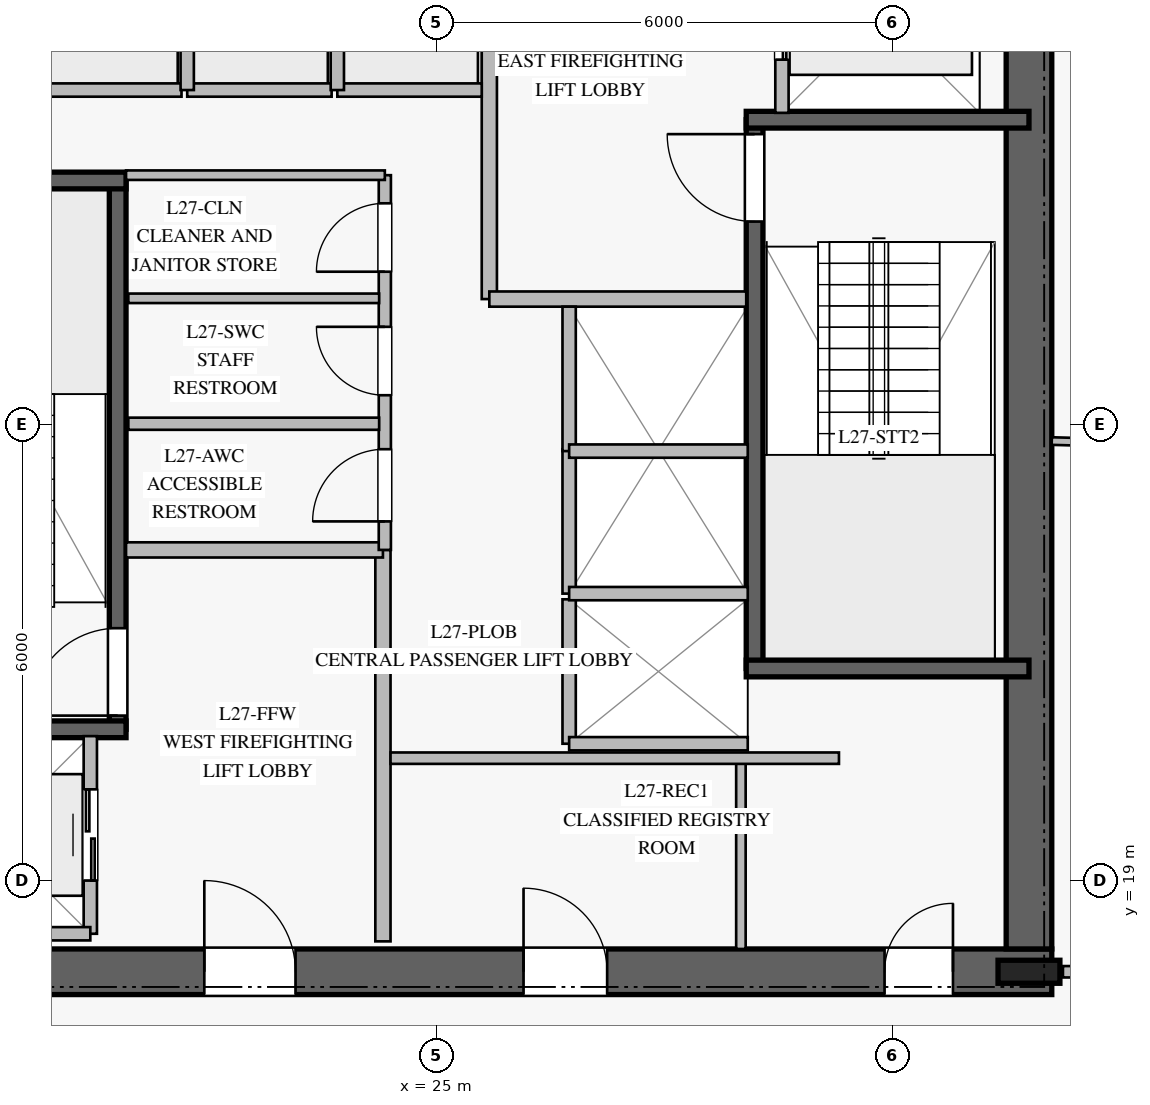
"""IFC4 building model, lengths in metres.
Left out: names, types, materials, properties, quantities, classifications, styles, units other than length and angle.
Written with IfcOpenShell. Run it as: python <this file> out.ifc"""

import sys

from ifc_helpers import new_model, si_unit, direction, frame, frame_2d, origin, origin_2d, place, context, subcontext, project, spatial, rectangle, i_section, extrude, element, fill, save


model = new_model("IFC4")
c1 = context("Model", 3, precision=1e-05, world=origin(), true_north=direction((0.0, 1.0)))
c2 = subcontext(c1, "Body", "Model", "MODEL_VIEW")
j1 = project(units=[si_unit("LENGTHUNIT", "METRE"), si_unit("PLANEANGLEUNIT", "RADIAN")], contexts=[c1])
p1 = place(None, origin())
s1 = spatial("IfcSite", under=j1, at=p1, CompositionType="ELEMENT")
p2 = place(p1, origin())
s2 = spatial("IfcBuilding", under=s1, at=p2, CompositionType="ELEMENT")
p3 = place(p2, frame((0.0, 0.0, 114.4)))
s3 = spatial("IfcBuildingStorey", under=s2, at=p3, CompositionType="ELEMENT", Elevation=114.4)
p4 = place(p3, frame((16.9, 17.8, 0.0), z_axis=(0.0, 0.0, 1.0), x_axis=(1.0, 0.0, 0.0)))
e1 = element("IfcWall", 1, at=p4, inside=s3, PredefinedType="SHEAR", context=c2, shape_type="SweptSolid", body=[
    extrude(rectangle(XDim=16.2, YDim=0.6, at=frame_2d((8.1, 0.0))), origin(), (0.0, 0.0, 1.0), 3.76),
])
p5 = place(p4, frame((5.05, 0.0, 0.0)))
e2 = element("IfcOpeningElement", 2, at=p5, cuts=e1, PredefinedType="OPENING", context=c2, shape_type="SweptSolid", body=[
    extrude(rectangle(XDim=1.2, YDim=2.25, at=frame_2d((0.6, 1.125))), frame((0.0, 0.31, 0.0), z_axis=(0.0, -1.0, 0.0), x_axis=(1.0, 0.0, 0.0)), (0.0, 0.0, 1.0), 0.62),
])
p6 = place(p4, frame((14.0, 0.0, 0.0)))
e3 = element("IfcOpeningElement", 3, at=p6, cuts=e1, PredefinedType="OPENING", context=c2, shape_type="SweptSolid", body=[
    extrude(rectangle(XDim=0.9, YDim=2.1, at=frame_2d((0.45, 1.05))), frame((0.0, 0.31, 0.0), z_axis=(0.0, -1.0, 0.0), x_axis=(1.0, 0.0, 0.0)), (0.0, 0.0, 1.0), 0.62),
])
p7 = place(p4, frame((9.25, 0.0, 0.0)))
e4 = element("IfcOpeningElement", 4, at=p7, cuts=e1, PredefinedType="OPENING", context=c2, shape_type="SweptSolid", body=[
    extrude(rectangle(XDim=1.1, YDim=2.2, at=frame_2d((0.55, 1.1))), frame((0.0, 0.31, 0.0), z_axis=(0.0, -1.0, 0.0), x_axis=(1.0, 0.0, 0.0)), (0.0, 0.0, 1.0), 0.62),
])
p8 = place(p3, frame((32.8, 18.1, 0.0), z_axis=(0.0, 0.0, 1.0), x_axis=(0.0, 1.0, 0.0)))
e5 = element("IfcWall", 5, at=p8, inside=s3, PredefinedType="SHEAR", context=c2, shape_type="SweptSolid", body=[
    extrude(rectangle(XDim=13.8, YDim=0.6, at=frame_2d((6.9, 0.0))), origin(), (0.0, 0.0, 1.0), 3.76),
])
p9 = place(p3, frame((32.8, 17.8, 0.0), z_axis=(0.0, 0.0, 1.0), x_axis=(1.0, 0.0, 0.0)))
e6 = element("IfcColumn", 6, at=p9, inside=s3, PredefinedType="COLUMN", context=c2, shape_type="SweptSolid", body=[
    extrude(i_section(OverallWidth=0.303, OverallDepth=0.814, WebThickness=0.021, FlangeThickness=0.04, at=origin_2d()), origin(), (0.0, 0.0, 1.0), 4.0),
])
p10 = place(p3, frame((20.81, 20.99, 0.0), z_axis=(0.0, 0.0, 1.0), x_axis=(0.0, 1.0, 0.0)))
e7 = element("IfcWall", 7, at=p10, inside=s3, PredefinedType="SOLIDWALL", context=c2, shape_type="SweptSolid", body=[
    extrude(rectangle(XDim=7.22, YDim=0.22, at=frame_2d((3.61, 0.0))), origin(), (0.0, 0.0, 1.0), 3.76),
])
p11 = place(p10, frame((0.18, 0.0, 0.0)))
e8 = element("IfcOpeningElement", 8, at=p11, cuts=e7, PredefinedType="OPENING", context=c2, shape_type="SweptSolid", body=[
    extrude(rectangle(XDim=1.15, YDim=2.2, at=frame_2d((0.575, 1.1))), frame((0.0, 0.12, 0.0), z_axis=(0.0, -1.0, 0.0), x_axis=(1.0, 0.0, 0.0)), (0.0, 0.0, 1.0), 0.24),
])
for number, where, z_axis, x_axis in (
    (9, (17.2, 20.99, 0.0), (0.0, 0.0, 1.0), (1.0, 0.0, 0.0)),
    (10, (17.2, 28.21, 0.0), (0.0, 0.0, 1.0), (1.0, 0.0, 0.0)),
):
    element("IfcWall", number, at=place(p3, frame(where, z_axis=z_axis, x_axis=x_axis)), inside=s3, PredefinedType="SOLIDWALL", context=c2, shape_type="SweptSolid", body=[
        extrude(rectangle(XDim=3.72, YDim=0.22, at=frame_2d((1.86, 0.0))), origin(), (0.0, 0.0, 1.0), 3.76),
    ])
p12 = place(p3, frame((29.19, 21.79, 0.0), z_axis=(0.0, 0.0, 1.0), x_axis=(0.0, 1.0, 0.0)))
e11 = element("IfcWall", 11, at=p12, inside=s3, PredefinedType="SOLIDWALL", context=c2, shape_type="SweptSolid", body=[
    extrude(rectangle(XDim=7.22, YDim=0.22, at=frame_2d((3.61, 0.0))), origin(), (0.0, 0.0, 1.0), 3.76),
])
p13 = place(p12, frame((5.88, 0.0, 0.0)))
e12 = element("IfcOpeningElement", 12, at=p13, cuts=e11, PredefinedType="OPENING", context=c2, shape_type="SweptSolid", body=[
    extrude(rectangle(XDim=1.15, YDim=2.2, at=frame_2d((0.575, 1.1))), frame((0.0, 0.12, 0.0), z_axis=(0.0, -1.0, 0.0), x_axis=(1.0, 0.0, 0.0)), (0.0, 0.0, 1.0), 0.24),
])
for number, where, z_axis, x_axis in (
    (13, (29.08, 21.79, 0.0), (0.0, 0.0, 1.0), (1.0, 0.0, 0.0)),
    (14, (29.08, 29.01, 0.0), (0.0, 0.0, 1.0), (1.0, 0.0, 0.0)),
):
    element("IfcWall", number, at=place(p3, frame(where, z_axis=z_axis, x_axis=x_axis)), inside=s3, PredefinedType="SOLIDWALL", context=c2, shape_type="SweptSolid", body=[
        extrude(rectangle(XDim=3.72, YDim=0.22, at=frame_2d((1.86, 0.0))), origin(), (0.0, 0.0, 1.0), 3.76),
    ])
p14 = place(p3, frame((24.3, 18.2, 0.0), z_axis=(0.0, 0.0, 1.0), x_axis=(0.0, 1.0, 0.0)))
e15 = element("IfcWall", 15, at=p14, inside=s3, PredefinedType="PARTITIONING", context=c2, shape_type="SweptSolid", body=[
    extrude(rectangle(XDim=5.15, YDim=0.2, at=frame_2d((2.575, 0.0))), origin(), (0.0, 0.0, 1.0), 3.76),
])
p15 = place(p3, frame((20.92, 23.35, 0.0), z_axis=(0.0, 0.0, 1.0), x_axis=(1.0, 0.0, 0.0)))
e16 = element("IfcWall", 16, at=p15, inside=s3, PredefinedType="PARTITIONING", context=c2, shape_type="SweptSolid", body=[
    extrude(rectangle(XDim=3.38, YDim=0.2, at=frame_2d((1.69, 0.0))), origin(), (0.0, 0.0, 1.0), 3.76),
])
p16 = place(p3, frame((25.7, 26.65, 0.0), z_axis=(0.0, 0.0, 1.0), x_axis=(0.0, 1.0, 0.0)))
e17 = element("IfcWall", 17, at=p16, inside=s3, PredefinedType="PARTITIONING", context=c2, shape_type="SweptSolid", body=[
    extrude(rectangle(XDim=5.15, YDim=0.2, at=frame_2d((2.575, 0.0))), origin(), (0.0, 0.0, 1.0), 3.76),
])
p17 = place(p3, frame((25.7, 26.65, 0.0), z_axis=(0.0, 0.0, 1.0), x_axis=(1.0, 0.0, 0.0)))
e18 = element("IfcWall", 18, at=p17, inside=s3, PredefinedType="PARTITIONING", context=c2, shape_type="SweptSolid", body=[
    extrude(rectangle(XDim=3.38, YDim=0.2, at=frame_2d((1.69, 0.0))), origin(), (0.0, 0.0, 1.0), 3.76),
])
p18 = place(p3, frame((24.325, 23.35, 0.0), z_axis=(0.0, 0.0, 1.0), x_axis=(0.0, 1.0, 0.0)))
e19 = element("IfcWall", 19, at=p18, inside=s3, PredefinedType="PLUMBINGWALL", context=c2, shape_type="SweptSolid", body=[
    extrude(rectangle(XDim=4.93, YDim=0.16, at=frame_2d((2.465, 0.0))), origin(), (0.0, 0.0, 1.0), 3.76),
])
p19 = place(p18, frame((0.375, 0.0, 0.0)))
e20 = element("IfcOpeningElement", 20, at=p19, cuts=e19, PredefinedType="OPENING", context=c2, shape_type="SweptSolid", body=[
    extrude(rectangle(XDim=0.95, YDim=2.1, at=frame_2d((0.475, 1.05))), frame((0.0, 0.09, 0.0), z_axis=(0.0, -1.0, 0.0), x_axis=(1.0, 0.0, 0.0)), (0.0, 0.0, 1.0), 0.18),
])
p20 = place(p18, frame((2.035, 0.0, 0.0)))
e21 = element("IfcOpeningElement", 21, at=p20, cuts=e19, PredefinedType="OPENING", context=c2, shape_type="SweptSolid", body=[
    extrude(rectangle(XDim=0.9, YDim=2.1, at=frame_2d((0.45, 1.05))), frame((0.0, 0.09, 0.0), z_axis=(0.0, -1.0, 0.0), x_axis=(1.0, 0.0, 0.0)), (0.0, 0.0, 1.0), 0.18),
])
p21 = place(p18, frame((3.66, 0.0, 0.0)))
e22 = element("IfcOpeningElement", 22, at=p21, cuts=e19, PredefinedType="OPENING", context=c2, shape_type="SweptSolid", body=[
    extrude(rectangle(XDim=0.9, YDim=2.1, at=frame_2d((0.45, 1.05))), frame((0.0, 0.09, 0.0), z_axis=(0.0, -1.0, 0.0), x_axis=(1.0, 0.0, 0.0)), (0.0, 0.0, 1.0), 0.18),
])
p22 = place(p3, frame((20.92, 28.28, 0.0), z_axis=(0.0, 0.0, 1.0), x_axis=(1.0, 0.0, 0.0)))
e23 = element("IfcWall", 23, at=p22, inside=s3, PredefinedType="PARTITIONING", context=c2, shape_type="SweptSolid", body=[
    extrude(rectangle(XDim=3.405, YDim=0.125, at=frame_2d((1.703, 0.0))), origin(), (0.0, 0.0, 1.0), 3.76),
])
p23 = place(p3, frame((29.01, 18.1, 0.0), z_axis=(0.0, 0.0, 1.0), x_axis=(0.0, 1.0, 0.0)))
e24 = element("IfcWall", 24, at=p23, inside=s3, PredefinedType="PARTITIONING", context=c2, shape_type="SweptSolid", body=[
    extrude(rectangle(XDim=2.45, YDim=0.125, at=frame_2d((1.225, 0.0))), origin(), (0.0, 0.0, 1.0), 3.76),
])
p24 = place(p3, frame((20.95, 25.01, 0.0), z_axis=(0.0, 0.0, 1.0), x_axis=(1.0, 0.0, 0.0)))
e25 = element("IfcWall", 25, at=p24, inside=s3, PredefinedType="PLUMBINGWALL", context=c2, shape_type="SweptSolid", body=[
    extrude(rectangle(XDim=3.3, YDim=0.16, at=frame_2d((1.65, 0.0))), origin(), (0.0, 0.0, 1.0), 3.76),
])
p25 = place(p3, frame((20.95, 26.66, 0.0), z_axis=(0.0, 0.0, 1.0), x_axis=(1.0, 0.0, 0.0)))
e26 = element("IfcWall", 26, at=p25, inside=s3, PredefinedType="PARTITIONING", context=c2, shape_type="SweptSolid", body=[
    extrude(rectangle(XDim=3.3, YDim=0.125, at=frame_2d((1.65, 0.0))), origin(), (0.0, 0.0, 1.0), 3.76),
])
p26 = place(p3, frame((24.4, 20.61, 0.0), z_axis=(0.0, 0.0, 1.0), x_axis=(1.0, 0.0, 0.0)))
e27 = element("IfcWall", 27, at=p26, inside=s3, PredefinedType="PARTITIONING", context=c2, shape_type="SweptSolid", body=[
    extrude(rectangle(XDim=5.9, YDim=0.15, at=frame_2d((2.95, 0.0))), origin(), (0.0, 0.0, 1.0), 3.76),
])
for number, where, z_axis, x_axis in (
    (28, (19.75, 29.4, 0.0), (0.0, 0.0, 1.0), (1.0, 0.0, 0.0)),
    (29, (21.725, 29.4, 0.0), (0.0, 0.0, 1.0), (1.0, 0.0, 0.0)),
):
    element("IfcWall", number, at=place(p3, frame(where, z_axis=z_axis, x_axis=x_axis)), inside=s3, PredefinedType="PARTITIONING", context=c2, shape_type="SweptSolid", body=[
        extrude(rectangle(XDim=1.9, YDim=0.175, at=frame_2d((0.95, 0.0))), origin(), (0.0, 0.0, 1.0), 3.76),
    ])
p27 = place(p3, frame((21.725, 29.4, 0.0), z_axis=(0.0, 0.0, 1.0), x_axis=(0.0, 1.0, 0.0)))
e30 = element("IfcWall", 30, at=p27, inside=s3, PredefinedType="PARTITIONING", context=c2, shape_type="SweptSolid", body=[
    extrude(rectangle(XDim=2.35, YDim=0.175, at=frame_2d((1.175, 0.0))), origin(), (0.0, 0.0, 1.0), 3.76),
])
p28 = place(p3, frame((23.7, 29.4, 0.0), z_axis=(0.0, 0.0, 1.0), x_axis=(1.0, 0.0, 0.0)))
e31 = element("IfcWall", 31, at=p28, inside=s3, PredefinedType="PARTITIONING", context=c2, shape_type="SweptSolid", body=[
    extrude(rectangle(XDim=1.9, YDim=0.175, at=frame_2d((0.95, 0.0))), origin(), (0.0, 0.0, 1.0), 3.76),
])
p29 = place(p3, frame((23.7, 29.4, 0.0), z_axis=(0.0, 0.0, 1.0), x_axis=(0.0, 1.0, 0.0)))
e32 = element("IfcWall", 32, at=p29, inside=s3, PredefinedType="PARTITIONING", context=c2, shape_type="SweptSolid", body=[
    extrude(rectangle(XDim=2.35, YDim=0.175, at=frame_2d((1.175, 0.0))), origin(), (0.0, 0.0, 1.0), 3.76),
])
p30 = place(p3, frame((26.75, 20.8, 0.0), z_axis=(0.0, 0.0, 1.0), x_axis=(0.0, 1.0, 0.0)))
e33 = element("IfcWall", 33, at=p30, inside=s3, PredefinedType="PARTITIONING", context=c2, shape_type="SweptSolid", body=[
    extrude(rectangle(XDim=1.9, YDim=0.175, at=frame_2d((0.95, 0.0))), origin(), (0.0, 0.0, 1.0), 3.76),
])
p31 = place(p3, frame((26.75, 20.8, 0.0), z_axis=(0.0, 0.0, 1.0), x_axis=(1.0, 0.0, 0.0)))
e34 = element("IfcWall", 34, at=p31, inside=s3, PredefinedType="PARTITIONING", context=c2, shape_type="SweptSolid", body=[
    extrude(rectangle(XDim=2.35, YDim=0.175, at=frame_2d((1.175, 0.0))), origin(), (0.0, 0.0, 1.0), 3.76),
])
p32 = place(p3, frame((26.75, 22.775, 0.0), z_axis=(0.0, 0.0, 1.0), x_axis=(0.0, 1.0, 0.0)))
e35 = element("IfcWall", 35, at=p32, inside=s3, PredefinedType="PARTITIONING", context=c2, shape_type="SweptSolid", body=[
    extrude(rectangle(XDim=1.9, YDim=0.175, at=frame_2d((0.95, 0.0))), origin(), (0.0, 0.0, 1.0), 3.76),
])
p33 = place(p3, frame((26.75, 22.775, 0.0), z_axis=(0.0, 0.0, 1.0), x_axis=(1.0, 0.0, 0.0)))
e36 = element("IfcWall", 36, at=p33, inside=s3, PredefinedType="PARTITIONING", context=c2, shape_type="SweptSolid", body=[
    extrude(rectangle(XDim=2.35, YDim=0.175, at=frame_2d((1.175, 0.0))), origin(), (0.0, 0.0, 1.0), 3.76),
])
p34 = place(p3, frame((26.75, 24.65, 0.0), z_axis=(0.0, 0.0, 1.0), x_axis=(0.0, 1.0, 0.0)))
e37 = element("IfcWall", 37, at=p34, inside=s3, PredefinedType="PARTITIONING", context=c2, shape_type="SweptSolid", body=[
    extrude(rectangle(XDim=1.9, YDim=0.175, at=frame_2d((0.95, 0.0))), origin(), (0.0, 0.0, 1.0), 3.76),
])
p35 = place(p3, frame((26.75, 24.65, 0.0), z_axis=(0.0, 0.0, 1.0), x_axis=(1.0, 0.0, 0.0)))
e38 = element("IfcWall", 38, at=p35, inside=s3, PredefinedType="PARTITIONING", context=c2, shape_type="SweptSolid", body=[
    extrude(rectangle(XDim=2.35, YDim=0.175, at=frame_2d((1.175, 0.0))), origin(), (0.0, 0.0, 1.0), 3.76),
])
p36 = place(p3, frame((20.45, 18.3, 0.0), z_axis=(0.0, 0.0, 1.0), x_axis=(0.0, 1.0, 0.0)))
e39 = element("IfcWall", 39, at=p36, inside=s3, PredefinedType="PARTITIONING", context=c2, shape_type="SweptSolid", body=[
    extrude(rectangle(XDim=2.6, YDim=0.175, at=frame_2d((1.3, 0.0))), origin(), (0.0, 0.0, 1.0), 3.76),
])
p37 = place(p36, frame((0.7, 0.0, 0.0)))
e40 = element("IfcOpeningElement", 40, at=p37, cuts=e39, PredefinedType="OPENING", context=c2, shape_type="SweptSolid", body=[
    extrude(rectangle(XDim=1.2, YDim=2.2, at=frame_2d((0.6, 1.1))), frame((0.0, 0.098, 0.0), z_axis=(0.0, -1.0, 0.0), x_axis=(1.0, 0.0, 0.0)), (0.0, 0.0, 1.0), 0.195),
])
p38 = place(p3, frame((17.85, 18.3, 0.0), z_axis=(0.0, 0.0, 1.0), x_axis=(1.0, 0.0, 0.0)))
e41 = element("IfcWall", 41, at=p38, inside=s3, PredefinedType="PARTITIONING", context=c2, shape_type="SweptSolid", body=[
    extrude(rectangle(XDim=2.6, YDim=0.175, at=frame_2d((1.3, 0.0))), origin(), (0.0, 0.0, 1.0), 3.76),
])
p39 = place(p3, frame((29.55, 29.1, 0.0), z_axis=(0.0, 0.0, 1.0), x_axis=(0.0, 1.0, 0.0)))
e42 = element("IfcWall", 42, at=p39, inside=s3, PredefinedType="PARTITIONING", context=c2, shape_type="SweptSolid", body=[
    extrude(rectangle(XDim=2.6, YDim=0.175, at=frame_2d((1.3, 0.0))), origin(), (0.0, 0.0, 1.0), 3.76),
])
p40 = place(p39, frame((0.7, 0.0, 0.0)))
e43 = element("IfcOpeningElement", 43, at=p40, cuts=e42, PredefinedType="OPENING", context=c2, shape_type="SweptSolid", body=[
    extrude(rectangle(XDim=1.2, YDim=2.2, at=frame_2d((0.6, 1.1))), frame((0.0, 0.098, 0.0), z_axis=(0.0, -1.0, 0.0), x_axis=(1.0, 0.0, 0.0)), (0.0, 0.0, 1.0), 0.195),
])
p41 = place(p3, frame((33.247, 17.8, 0.0), z_axis=(0.0, 0.0, 1.0), x_axis=(1.0, 0.0, 0.0)))
e44 = element("IfcWall", 44, at=p41, inside=s3, PredefinedType="PARTITIONING", context=c2, shape_type="SweptSolid", body=[
    extrude(rectangle(XDim=7.953, YDim=0.15, at=frame_2d((3.977, 0.0))), origin(), (0.0, 0.0, 1.0), 3.05),
])
p42 = place(p41, frame((3.338, 0.0, 0.0)))
e45 = element("IfcOpeningElement", 45, at=p42, cuts=e44, PredefinedType="OPENING", context=c2, shape_type="SweptSolid", body=[
    extrude(rectangle(XDim=1.1, YDim=2.2, at=frame_2d((0.55, 1.1))), frame((0.0, 0.085, 0.0), z_axis=(0.0, -1.0, 0.0), x_axis=(1.0, 0.0, 0.0)), (0.0, 0.0, 1.0), 0.17),
])
p43 = place(p3, frame((33.1, 24.782, 0.0), z_axis=(0.0, 0.0, 1.0), x_axis=(0.999635698047, -0.026990205435, 0.0)))
e46 = element("IfcWall", 46, at=p43, inside=s3, PredefinedType="MOVABLE", context=c2, shape_type="SweptSolid", body=[
    extrude(rectangle(XDim=11.741, YDim=0.1, at=frame_2d((5.871, 0.0))), origin(), (0.0, 0.0, 1.0), 3.05),
])
p44 = place(p11, origin())
e47 = element("IfcDoor", 47, at=p44, inside=s3, OperationType="SINGLE_SWING_LEFT", PredefinedType="DOOR", context=c2, shape_type="SweptSolid", body=[
    extrude(rectangle(XDim=1.15, YDim=2.2, at=frame_2d((0.575, 1.1))), frame((0.0, 0.025, 0.0), z_axis=(0.0, -1.0, 0.0), x_axis=(1.0, 0.0, 0.0)), (0.0, 0.0, 1.0), 0.05),
])
fill(e8, e47)
p45 = place(p13, origin())
e48 = element("IfcDoor", 48, at=p45, inside=s3, OperationType="SINGLE_SWING_RIGHT", PredefinedType="DOOR", context=c2, shape_type="SweptSolid", body=[
    extrude(rectangle(XDim=1.15, YDim=2.2, at=frame_2d((0.575, 1.1))), frame((0.0, 0.025, 0.0), z_axis=(0.0, -1.0, 0.0), x_axis=(1.0, 0.0, 0.0)), (0.0, 0.0, 1.0), 0.05),
])
fill(e12, e48)
p46 = place(p5, origin())
e49 = element("IfcDoor", 49, at=p46, inside=s3, OperationType="SINGLE_SWING_LEFT", PredefinedType="DOOR", context=c2, shape_type="SweptSolid", body=[
    extrude(rectangle(XDim=1.2, YDim=2.25, at=frame_2d((0.6, 1.125))), frame((0.0, 0.025, 0.0), z_axis=(0.0, -1.0, 0.0), x_axis=(1.0, 0.0, 0.0)), (0.0, 0.0, 1.0), 0.05),
])
fill(e2, e49)
p47 = place(p19, origin())
e50 = element("IfcDoor", 50, at=p47, inside=s3, OperationType="SINGLE_SWING_LEFT", PredefinedType="DOOR", context=c2, shape_type="SweptSolid", body=[
    extrude(rectangle(XDim=0.95, YDim=2.1, at=frame_2d((0.475, 1.05))), frame((0.0, 0.025, 0.0), z_axis=(0.0, -1.0, 0.0), x_axis=(1.0, 0.0, 0.0)), (0.0, 0.0, 1.0), 0.05),
])
fill(e20, e50)
p48 = place(p20, origin())
e51 = element("IfcDoor", 51, at=p48, inside=s3, OperationType="SINGLE_SWING_RIGHT", PredefinedType="DOOR", context=c2, shape_type="SweptSolid", body=[
    extrude(rectangle(XDim=0.9, YDim=2.1, at=frame_2d((0.45, 1.05))), frame((0.0, 0.025, 0.0), z_axis=(0.0, -1.0, 0.0), x_axis=(1.0, 0.0, 0.0)), (0.0, 0.0, 1.0), 0.05),
])
fill(e21, e51)
p49 = place(p21, origin())
e52 = element("IfcDoor", 52, at=p49, inside=s3, OperationType="SINGLE_SWING_LEFT", PredefinedType="DOOR", context=c2, shape_type="SweptSolid", body=[
    extrude(rectangle(XDim=0.9, YDim=2.1, at=frame_2d((0.45, 1.05))), frame((0.0, 0.025, 0.0), z_axis=(0.0, -1.0, 0.0), x_axis=(1.0, 0.0, 0.0)), (0.0, 0.0, 1.0), 0.05),
])
fill(e22, e52)
p50 = place(p6, origin())
e53 = element("IfcDoor", 53, at=p50, inside=s3, OperationType="SINGLE_SWING_RIGHT", PredefinedType="DOOR", context=c2, shape_type="SweptSolid", body=[
    extrude(rectangle(XDim=0.9, YDim=2.1, at=frame_2d((0.45, 1.05))), frame((0.0, 0.025, 0.0), z_axis=(0.0, -1.0, 0.0), x_axis=(1.0, 0.0, 0.0)), (0.0, 0.0, 1.0), 0.05),
])
fill(e3, e53)
p51 = place(p7, origin())
e54 = element("IfcDoor", 54, at=p51, inside=s3, OperationType="SINGLE_SWING_LEFT", PredefinedType="DOOR", context=c2, shape_type="SweptSolid", body=[
    extrude(rectangle(XDim=1.1, YDim=2.2, at=frame_2d((0.55, 1.1))), frame((0.0, 0.025, 0.0), z_axis=(0.0, -1.0, 0.0), x_axis=(1.0, 0.0, 0.0)), (0.0, 0.0, 1.0), 0.05),
])
fill(e4, e54)
p52 = place(p37, origin())
e55 = element("IfcDoor", 55, at=p52, inside=s3, OperationType="DOUBLE_DOOR_SLIDING", PredefinedType="DOOR", context=c2, shape_type="SweptSolid", body=[
    extrude(rectangle(XDim=1.2, YDim=2.2, at=frame_2d((0.6, 1.1))), frame((0.0, 0.025, 0.0), z_axis=(0.0, -1.0, 0.0), x_axis=(1.0, 0.0, 0.0)), (0.0, 0.0, 1.0), 0.05),
])
fill(e40, e55)
p53 = place(p40, origin())
e56 = element("IfcDoor", 56, at=p53, inside=s3, OperationType="DOUBLE_DOOR_SLIDING", PredefinedType="DOOR", context=c2, shape_type="SweptSolid", body=[
    extrude(rectangle(XDim=1.2, YDim=2.2, at=frame_2d((0.6, 1.1))), frame((0.0, 0.025, 0.0), z_axis=(0.0, -1.0, 0.0), x_axis=(1.0, 0.0, 0.0)), (0.0, 0.0, 1.0), 0.05),
])
fill(e43, e56)
save(model, sys.argv[1])
